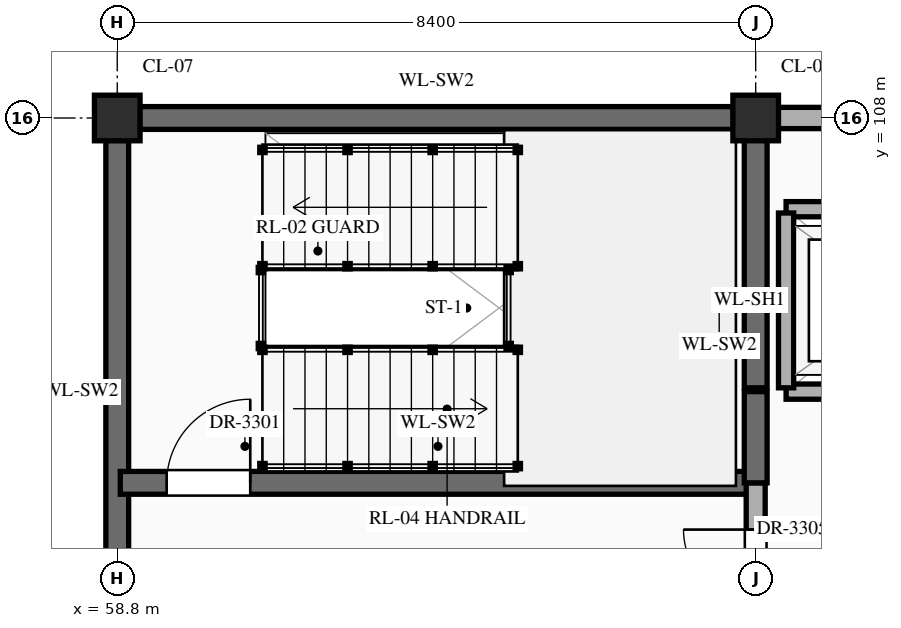
"""IFC4 building model, lengths in metres.
Left out: names, types, materials, properties, quantities, classifications, styles, units other than length and angle.
Written with IfcOpenShell. Run it as: python <this file> out.ifc"""

import sys

from ifc_helpers import new_model, si_unit, direction, frame, frame_2d, origin, origin_2d, place, context, subcontext, project, spatial, rectangle, extrude, element, fill, save


model = new_model("IFC4")
c1 = context("Model", 3, precision=1e-05, world=origin(), true_north=direction((0.0, 1.0)))
c2 = subcontext(c1, "Body", "Model", "MODEL_VIEW")
j1 = project(units=[si_unit("LENGTHUNIT", "METRE"), si_unit("PLANEANGLEUNIT", "RADIAN")], contexts=[c1])
p1 = place(None, origin())
s1 = spatial("IfcSite", under=j1, at=p1, CompositionType="ELEMENT")
p2 = place(p1, origin())
s2 = spatial("IfcBuilding", under=s1, at=p2, CompositionType="ELEMENT")
p3 = place(p2, frame((0.0, 0.0, 64.5)))
s3 = spatial("IfcBuildingStorey", under=s2, at=p3, CompositionType="ELEMENT", Elevation=64.5)
for number, where, z_axis, x_axis in (
    (1, (58.8, 108.0, 0.0), (0.0, 0.0, 1.0), (1.0, 0.0, 0.0)),
    (2, (67.2, 108.0, 0.0), (0.0, 0.0, 1.0), (1.0, 0.0, 0.0)),
):
    element("IfcColumn", number, at=place(p3, frame(where, z_axis=z_axis, x_axis=x_axis)), inside=s3, PredefinedType="COLUMN", context=c2, shape_type="SweptSolid", body=[
        extrude(rectangle(XDim=0.6, YDim=0.6, at=origin_2d()), origin(), (0.0, 0.0, 1.0), 4.2),
    ])
p4 = place(p3, frame((59.095, 108.0, 0.0), z_axis=(0.0, 0.0, 1.0), x_axis=(1.0, 0.0, 0.0)))
e3 = element("IfcWall", 3, at=p4, inside=s3, PredefinedType="SHEAR", context=c2, shape_type="SweptSolid", body=[
    extrude(rectangle(XDim=7.81, YDim=0.3, at=frame_2d((3.905, 0.0))), origin(), (0.0, 0.0, 1.0), 3.95),
])
p5 = place(p3, frame((58.8, 101.095, 0.0), z_axis=(0.0, 0.0, 1.0), x_axis=(0.0, 1.0, 0.0)))
e4 = element("IfcWall", 4, at=p5, inside=s3, PredefinedType="SHEAR", context=c2, shape_type="SweptSolid", body=[
    extrude(rectangle(XDim=6.61, YDim=0.3, at=frame_2d((3.305, 0.0))), origin(), (0.0, 0.0, 1.0), 3.95),
])
p6 = place(p3, frame((67.495, 108.0, 0.0), z_axis=(0.0, 0.0, 1.0), x_axis=(1.0, 0.0, 0.0)))
e5 = element("IfcWall", 5, at=p6, inside=s3, PredefinedType="STANDARD", context=c2, shape_type="SweptSolid", body=[
    extrude(rectangle(XDim=7.81, YDim=0.28, at=frame_2d((3.905, 0.0))), origin(), (0.0, 0.0, 1.0), 3.3),
])
p7 = place(p3, frame((58.84, 103.2, 0.0), z_axis=(0.0, 0.0, 1.0), x_axis=(1.0, 0.0, 0.0)))
e6 = element("IfcWall", 6, at=p7, inside=s3, PredefinedType="SHEAR", context=c2, shape_type="SweptSolid", body=[
    extrude(rectangle(XDim=8.36, YDim=0.3, at=frame_2d((4.18, 0.0))), origin(), (0.0, 0.0, 1.0), 3.95),
])
p8 = place(p7, frame((0.61, 0.0, 0.0)))
e7 = element("IfcOpeningElement", 7, at=p8, cuts=e6, PredefinedType="OPENING", context=c2, shape_type="SweptSolid", body=[
    extrude(rectangle(XDim=1.1, YDim=2.2, at=frame_2d((0.55, 1.1))), frame((0.0, 0.162, 0.0), z_axis=(0.0, -1.0, 0.0), x_axis=(1.0, 0.0, 0.0)), (0.0, 0.0, 1.0), 0.324),
])
p9 = place(p3, frame((67.6, 104.4, 0.0), z_axis=(0.0, 0.0, 1.0), x_axis=(1.0, 0.0, 0.0)))
e8 = element("IfcWall", 8, at=p9, inside=s3, PredefinedType="STANDARD", context=c2, shape_type="SweptSolid", body=[
    extrude(rectangle(XDim=3.0, YDim=0.2, at=frame_2d((1.5, 0.0))), origin(), (0.0, 0.0, 1.0), 3.95),
])
p10 = place(p9, frame((0.9, 0.0, 0.0)))
e9 = element("IfcOpeningElement", 9, at=p10, cuts=e8, PredefinedType="OPENING", context=c2, shape_type="SweptSolid", body=[
    extrude(rectangle(XDim=1.2, YDim=2.15, at=frame_2d((0.6, 1.075))), frame((0.0, 0.112, 0.0), z_axis=(0.0, -1.0, 0.0), x_axis=(1.0, 0.0, 0.0)), (0.0, 0.0, 1.0), 0.224),
])
p11 = place(p3, frame((67.6, 106.8, 0.0), z_axis=(0.0, 0.0, 1.0), x_axis=(1.0, 0.0, 0.0)))
e10 = element("IfcWall", 10, at=p11, inside=s3, PredefinedType="STANDARD", context=c2, shape_type="SweptSolid", body=[
    extrude(rectangle(XDim=3.0, YDim=0.2, at=frame_2d((1.5, 0.0))), origin(), (0.0, 0.0, 1.0), 3.95),
])
p12 = place(p3, frame((67.2, 100.8, 0.0), z_axis=(0.0, 0.0, 1.0), x_axis=(0.0, 1.0, 0.0)))
e11 = element("IfcWall", 11, at=p12, inside=s3, PredefinedType="STANDARD", context=c2, shape_type="SweptSolid", body=[
    extrude(rectangle(XDim=2.4, YDim=0.25, at=frame_2d((1.2, 0.0))), origin(), (0.0, 0.0, 1.0), 3.2),
])
p13 = place(p12, frame((0.835, 0.0, 0.0)))
e12 = element("IfcOpeningElement", 12, at=p13, cuts=e11, PredefinedType="OPENING", context=c2, shape_type="SweptSolid", body=[
    extrude(rectangle(XDim=0.95, YDim=2.15, at=frame_2d((0.475, 1.075))), frame((0.0, 0.137, 0.0), z_axis=(0.0, -1.0, 0.0), x_axis=(1.0, 0.0, 0.0)), (0.0, 0.0, 1.0), 0.274),
])
p14 = place(p3, frame((67.2, 103.2, 0.0), z_axis=(0.0, 0.0, 1.0), x_axis=(0.0, 1.0, 0.0)))
e13 = element("IfcWall", 13, at=p14, inside=s3, PredefinedType="SHEAR", context=c2, shape_type="SweptSolid", body=[
    extrude(rectangle(XDim=1.2, YDim=0.3, at=frame_2d((0.6, 0.0))), origin(), (0.0, 0.0, 1.0), 3.95),
])
p15 = place(p3, frame((67.2, 104.45, 0.0), z_axis=(0.0, 0.0, 1.0), x_axis=(0.0, 1.0, 0.0)))
e14 = element("IfcWall", 14, at=p15, inside=s3, PredefinedType="SHEAR", context=c2, shape_type="SweptSolid", body=[
    extrude(rectangle(XDim=3.46, YDim=0.3, at=frame_2d((1.73, 0.0))), origin(), (0.0, 0.0, 1.0), 3.95),
])
p16 = place(p3, frame((67.6, 104.45, 0.0), z_axis=(0.0, 0.0, 1.0), x_axis=(0.0, 1.0, 0.0)))
e15 = element("IfcWall", 15, at=p16, inside=s3, PredefinedType="STANDARD", context=c2, shape_type="SweptSolid", body=[
    extrude(rectangle(XDim=2.3, YDim=0.2, at=frame_2d((1.15, 0.0))), origin(), (0.0, 0.0, 1.0), 3.95),
])
p17 = place(p8, origin())
e16 = element("IfcDoor", 16, at=p17, inside=s3, OperationType="SINGLE_SWING_RIGHT", PredefinedType="DOOR", context=c2, shape_type="SweptSolid", body=[
    extrude(rectangle(XDim=1.1, YDim=2.2, at=frame_2d((0.55, 1.1))), frame((0.0, 0.025, 0.0), z_axis=(0.0, -1.0, 0.0), x_axis=(1.0, 0.0, 0.0)), (0.0, 0.0, 1.0), 0.05),
])
fill(e7, e16)
p18 = place(p13, origin())
e17 = element("IfcDoor", 17, at=p18, inside=s3, OperationType="SINGLE_SWING_RIGHT", PredefinedType="DOOR", context=c2, shape_type="SweptSolid", body=[
    extrude(rectangle(XDim=0.95, YDim=2.15, at=frame_2d((0.475, 1.075))), frame((0.0, 0.025, 0.0), z_axis=(0.0, -1.0, 0.0), x_axis=(1.0, 0.0, 0.0)), (0.0, 0.0, 1.0), 0.05),
])
fill(e12, e17)
save(model, sys.argv[1])
